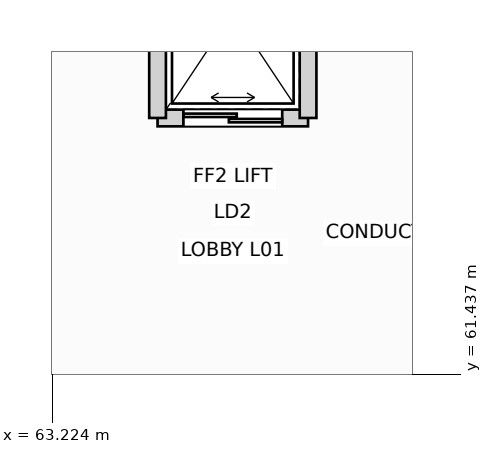
"""IFC4 building model, lengths in metres.
Left out: names, types, materials, properties, quantities, classifications, styles, units other than length and angle.
Written with IfcOpenShell. Run it as: python <this file> out.ifc"""

import sys

from ifc_helpers import new_model, si_unit, direction, frame, frame_2d, origin, place, context, subcontext, project, spatial, rectangle, extrude, element, fill, save


model = new_model("IFC4")
c1 = context("Model", 3, precision=1e-05, world=origin(), true_north=direction((0.0, 1.0)))
c2 = subcontext(c1, "Body", "Model", "MODEL_VIEW")
j1 = project(units=[si_unit("LENGTHUNIT", "METRE"), si_unit("PLANEANGLEUNIT", "RADIAN")], contexts=[c1])
p1 = place(None, origin())
s1 = spatial("IfcSite", under=j1, at=p1, CompositionType="ELEMENT")
p2 = place(p1, origin())
s2 = spatial("IfcBuilding", under=s1, at=p2, CompositionType="ELEMENT")
p3 = place(p2, frame((0.0, 0.0, 6.0)))
s3 = spatial("IfcBuildingStorey", under=s2, at=p3, CompositionType="ELEMENT", Elevation=6.0)
p4 = place(p3, frame((64.61, 64.81, 0.0), z_axis=(0.0, 0.0, 1.0), x_axis=(1.0, 0.0, 0.0)))
e1 = element("IfcWall", 1, at=p4, inside=s3, PredefinedType="PARTITIONING", context=c2, shape_type="SweptSolid", body=[
    extrude(rectangle(XDim=1.98, YDim=0.22, at=frame_2d((0.99, 0.0))), origin(), (0.0, 0.0, 1.0), 5.015),
])
p5 = place(p4, frame((0.34, 0.0, 0.0)))
e2 = element("IfcOpeningElement", 2, at=p5, cuts=e1, PredefinedType="OPENING", context=c2, shape_type="SweptSolid", body=[
    extrude(rectangle(XDim=1.3, YDim=2.2, at=frame_2d((0.65, 1.1))), frame((0.0, 0.12, 0.0), z_axis=(0.0, -1.0, 0.0), x_axis=(1.0, 0.0, 0.0)), (0.0, 0.0, 1.0), 0.24),
])
for number, where, z_axis, x_axis in (
    (3, (64.61, 64.81, 0.0), (0.0, 0.0, 1.0), (0.0, 1.0, 0.0)),
    (4, (66.59, 64.81, 0.0), (0.0, 0.0, 1.0), (0.0, 1.0, 0.0)),
):
    element("IfcWall", number, at=place(p3, frame(where, z_axis=z_axis, x_axis=x_axis)), inside=s3, PredefinedType="PARTITIONING", context=c2, shape_type="SweptSolid", body=[
        extrude(rectangle(XDim=2.78, YDim=0.22, at=frame_2d((1.39, 0.0))), origin(), (0.0, 0.0, 1.0), 4.775),
    ])
p6 = place(p5, origin())
e5 = element("IfcDoor", 5, at=p6, inside=s3, OperationType="DOUBLE_DOOR_SLIDING", PredefinedType="DOOR", context=c2, shape_type="SweptSolid", body=[
    extrude(rectangle(XDim=1.3, YDim=2.2, at=frame_2d((0.65, 1.1))), frame((0.0, 0.025, 0.0), z_axis=(0.0, -1.0, 0.0), x_axis=(1.0, 0.0, 0.0)), (0.0, 0.0, 1.0), 0.05),
])
fill(e2, e5)
save(model, sys.argv[1])
